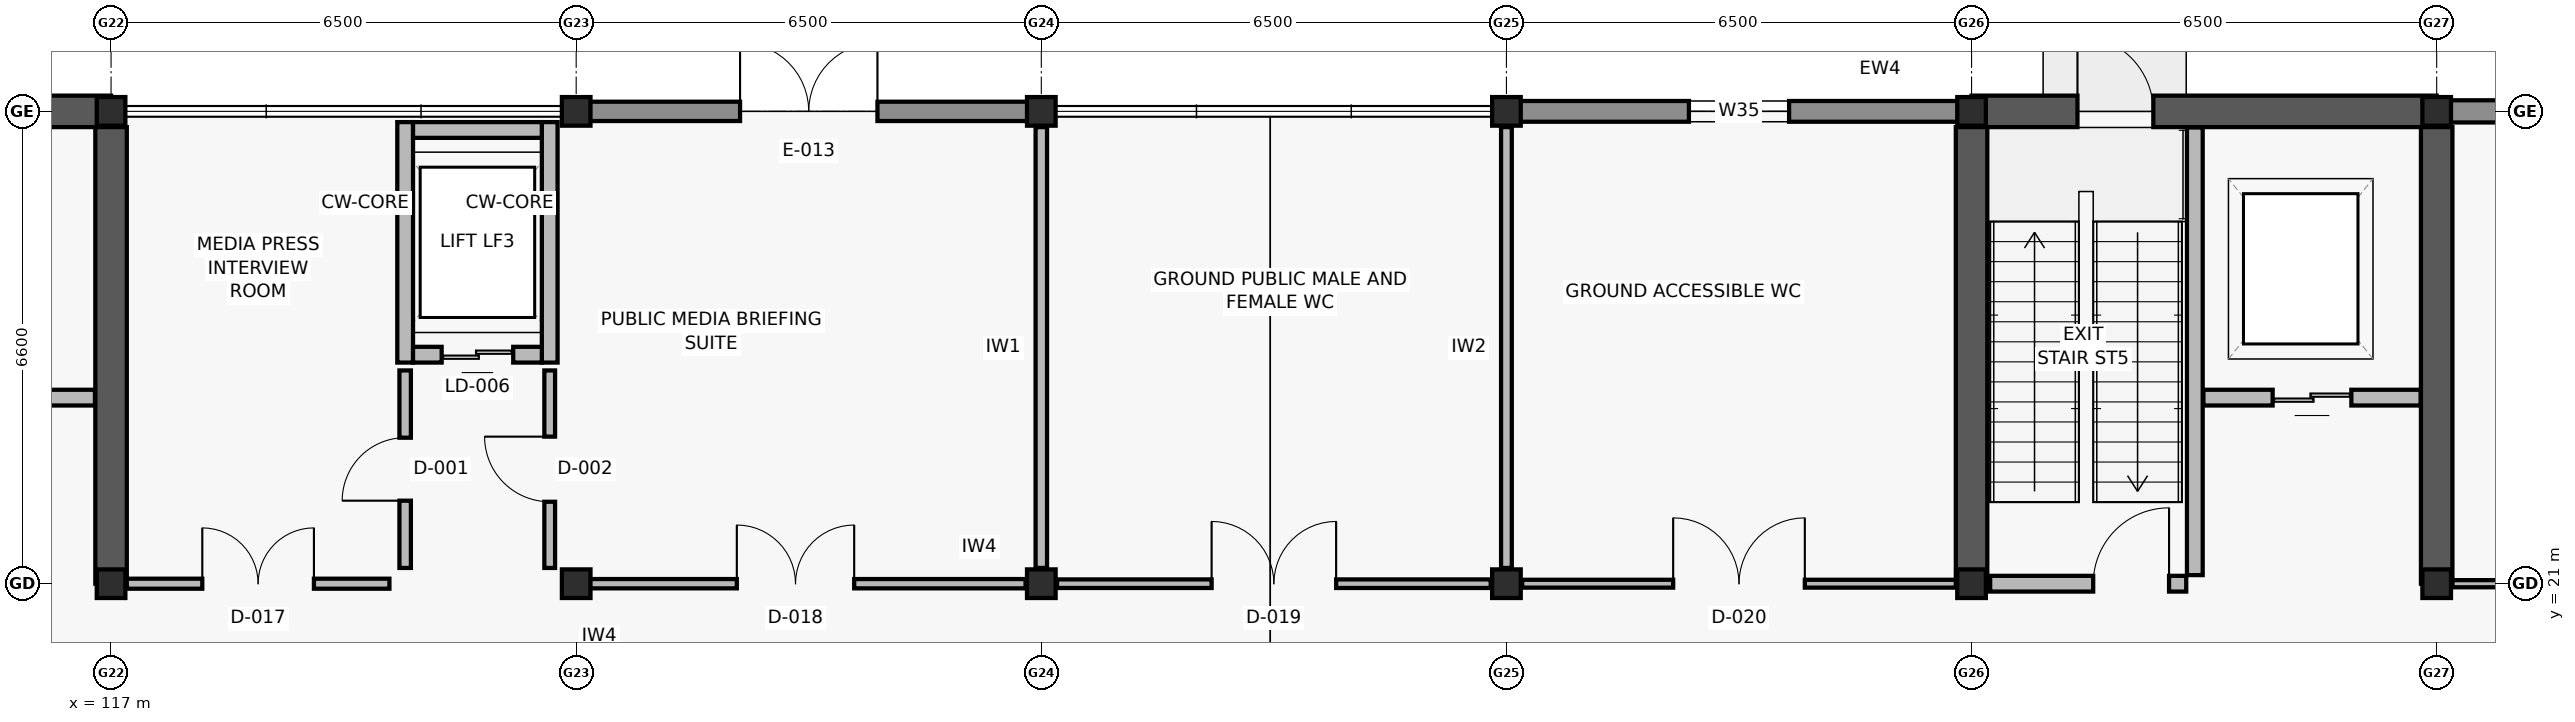
"""IFC4 building model, lengths in metres.
Left out: names, types, materials, properties, quantities, classifications, styles, units other than length and angle.
Written with IfcOpenShell. Run it as: python <this file> out.ifc"""

import sys

from ifc_helpers import new_model, si_unit, direction, frame, frame_2d, origin, origin_2d, place, context, subcontext, project, spatial, rectangle, i_section, extrude, element, fill, save


model = new_model("IFC4")
c1 = context("Model", 3, precision=1e-05, world=origin(), true_north=direction((0.0, 1.0)))
c2 = subcontext(c1, "Body", "Model", "MODEL_VIEW")
j1 = project(units=[si_unit("LENGTHUNIT", "METRE"), si_unit("PLANEANGLEUNIT", "RADIAN")], contexts=[c1])
p1 = place(None, origin())
s1 = spatial("IfcSite", under=j1, at=p1, CompositionType="ELEMENT")
p2 = place(p1, origin())
s2 = spatial("IfcBuilding", under=s1, at=p2, CompositionType="ELEMENT")
p3 = place(p2, origin())
s3 = spatial("IfcBuildingStorey", under=s2, at=p3, CompositionType="ELEMENT", Elevation=0.0)
for number, where, z_axis, x_axis in (
    (1, (117.0, 21.0, 0.0), (0.0, 0.0, 1.0), (1.0, 0.0, 0.0)),
    (2, (117.0, 27.6, 0.0), (0.0, 0.0, 1.0), (1.0, 0.0, 0.0)),
    (3, (123.5, 21.0, 0.0), (0.0, 0.0, 1.0), (1.0, 0.0, 0.0)),
    (4, (123.5, 27.6, 0.0), (0.0, 0.0, 1.0), (1.0, 0.0, 0.0)),
    (5, (130.0, 21.0, 0.0), (0.0, 0.0, 1.0), (1.0, 0.0, 0.0)),
    (6, (130.0, 27.6, 0.0), (0.0, 0.0, 1.0), (1.0, 0.0, 0.0)),
    (7, (136.5, 21.0, 0.0), (0.0, 0.0, 1.0), (1.0, 0.0, 0.0)),
    (8, (136.5, 27.6, 0.0), (0.0, 0.0, 1.0), (1.0, 0.0, 0.0)),
    (9, (143.0, 21.0, 0.0), (0.0, 0.0, 1.0), (1.0, 0.0, 0.0)),
    (10, (143.0, 27.6, 0.0), (0.0, 0.0, 1.0), (1.0, 0.0, 0.0)),
    (11, (149.5, 21.0, 0.0), (0.0, 0.0, 1.0), (1.0, 0.0, 0.0)),
    (12, (149.5, 27.6, 0.0), (0.0, 0.0, 1.0), (1.0, 0.0, 0.0)),
):
    element("IfcColumn", number, at=place(p3, frame(where, z_axis=z_axis, x_axis=x_axis)), inside=s3, PredefinedType="COLUMN", context=c2, shape_type="SweptSolid", body=[
        extrude(i_section(OverallWidth=0.4, OverallDepth=0.4, WebThickness=0.02, FlangeThickness=0.032, at=origin_2d()), origin(), (0.0, 0.0, 1.0), 5.4),
    ])
p4 = place(p3, frame((110.5, 27.6, 0.0), z_axis=(0.0, 0.0, 1.0), x_axis=(1.0, 0.0, 0.0)))
e13 = element("IfcWall", 13, at=p4, inside=s3, PredefinedType="SHEAR", context=c2, shape_type="SweptSolid", body=[
    extrude(rectangle(XDim=6.5, YDim=0.44, at=frame_2d((3.25, 0.0))), origin(), (0.0, 0.0, 1.0), 5.16),
])
p5 = place(p4, frame((1.48, 0.0, 0.0)))
e14 = element("IfcOpeningElement", 14, at=p5, cuts=e13, PredefinedType="OPENING", context=c2, shape_type="SweptSolid", body=[
    extrude(rectangle(XDim=1.06, YDim=2.12, at=frame_2d((0.53, 1.06))), frame((0.0, 0.23, 0.0), z_axis=(0.0, -1.0, 0.0), x_axis=(1.0, 0.0, 0.0)), (0.0, 0.0, 1.0), 0.46),
])
p6 = place(p3, frame((117.0, 21.0, 0.0), z_axis=(0.0, 0.0, 1.0), x_axis=(0.0, 1.0, 0.0)))
e15 = element("IfcWall", 15, at=p6, inside=s3, PredefinedType="SHEAR", context=c2, shape_type="SweptSolid", body=[
    extrude(rectangle(XDim=6.38, YDim=0.44, at=frame_2d((3.19, 0.0))), origin(), (0.0, 0.0, 1.0), 5.16),
])
p7 = place(p3, frame((143.0, 27.6, 0.0), z_axis=(0.0, 0.0, 1.0), x_axis=(1.0, 0.0, 0.0)))
e16 = element("IfcWall", 16, at=p7, inside=s3, PredefinedType="SHEAR", context=c2, shape_type="SweptSolid", body=[
    extrude(rectangle(XDim=6.5, YDim=0.44, at=frame_2d((3.25, 0.0))), origin(), (0.0, 0.0, 1.0), 5.16),
])
p8 = place(p7, frame((1.48, 0.0, 0.0)))
e17 = element("IfcOpeningElement", 17, at=p8, cuts=e16, PredefinedType="OPENING", context=c2, shape_type="SweptSolid", body=[
    extrude(rectangle(XDim=1.06, YDim=2.12, at=frame_2d((0.53, 1.06))), frame((0.0, 0.23, 0.0), z_axis=(0.0, -1.0, 0.0), x_axis=(1.0, 0.0, 0.0)), (0.0, 0.0, 1.0), 0.46),
])
for number, where, z_axis, x_axis in (
    (18, (143.0, 21.0, 0.0), (0.0, 0.0, 1.0), (0.0, 1.0, 0.0)),
    (19, (149.5, 21.0, 0.0), (0.0, 0.0, 1.0), (0.0, 1.0, 0.0)),
):
    element("IfcWall", number, at=place(p3, frame(where, z_axis=z_axis, x_axis=x_axis)), inside=s3, PredefinedType="SHEAR", context=c2, shape_type="SweptSolid", body=[
        extrude(rectangle(XDim=6.38, YDim=0.44, at=frame_2d((3.19, 0.0))), origin(), (0.0, 0.0, 1.0), 5.16),
    ])
p9 = place(p3, frame((123.505, 27.6, 0.0), z_axis=(0.0, 0.0, 1.0), x_axis=(1.0, 0.0, 0.0)))
e20 = element("IfcWall", 20, at=p9, inside=s3, PredefinedType="SOLIDWALL", context=c2, shape_type="SweptSolid", body=[
    extrude(rectangle(XDim=6.49, YDim=0.27, at=frame_2d((3.245, 0.0))), origin(), (0.0, 0.0, 1.0), 4.52),
])
p10 = place(p9, frame((2.285, 0.0, 0.0)))
e21 = element("IfcOpeningElement", 21, at=p10, cuts=e20, PredefinedType="OPENING", context=c2, shape_type="SweptSolid", body=[
    extrude(rectangle(XDim=1.92, YDim=2.25, at=frame_2d((0.96, 1.125))), frame((0.0, 0.145, 0.0), z_axis=(0.0, -1.0, 0.0), x_axis=(1.0, 0.0, 0.0)), (0.0, 0.0, 1.0), 0.29),
])
p11 = place(p3, frame((136.505, 27.6, 0.0), z_axis=(0.0, 0.0, 1.0), x_axis=(1.0, 0.0, 0.0)))
e22 = element("IfcWall", 22, at=p11, inside=s3, PredefinedType="SOLIDWALL", context=c2, shape_type="SweptSolid", body=[
    extrude(rectangle(XDim=6.49, YDim=0.29, at=frame_2d((3.245, 0.0))), origin(), (0.0, 0.0, 1.0), 4.52),
])
p12 = place(p11, frame((2.545, 0.0, 0.8)))
e23 = element("IfcOpeningElement", 23, at=p12, cuts=e22, PredefinedType="OPENING", context=c2, shape_type="SweptSolid", body=[
    extrude(rectangle(XDim=1.4, YDim=1.5, at=frame_2d((0.7, 0.75))), frame((0.0, 0.155, 0.0), z_axis=(0.0, -1.0, 0.0), x_axis=(1.0, 0.0, 0.0)), (0.0, 0.0, 1.0), 0.31),
])
p13 = place(p3, frame((149.505, 27.6, 0.0), z_axis=(0.0, 0.0, 1.0), x_axis=(1.0, 0.0, 0.0)))
e24 = element("IfcWall", 24, at=p13, inside=s3, PredefinedType="SOLIDWALL", context=c2, shape_type="SweptSolid", body=[
    extrude(rectangle(XDim=6.49, YDim=0.31, at=frame_2d((3.245, 0.0))), origin(), (0.0, 0.0, 1.0), 4.52),
])
p14 = place(p13, frame((2.47, 0.0, 0.8)))
e25 = element("IfcOpeningElement", 25, at=p14, cuts=e24, PredefinedType="OPENING", context=c2, shape_type="SweptSolid", body=[
    extrude(rectangle(XDim=1.55, YDim=1.5, at=frame_2d((0.775, 0.75))), frame((0.0, 0.165, 0.0), z_axis=(0.0, -1.0, 0.0), x_axis=(1.0, 0.0, 0.0)), (0.0, 0.0, 1.0), 0.33),
])
p15 = place(p3, frame((113.74, 23.6, 0.0), z_axis=(0.0, 0.0, 1.0), x_axis=(1.0, 0.0, 0.0)))
e26 = element("IfcWall", 26, at=p15, inside=s3, PredefinedType="SOLIDWALL", context=c2, shape_type="SweptSolid", body=[
    extrude(rectangle(XDim=3.035, YDim=0.22, at=frame_2d((1.518, 0.0))), origin(), (0.0, 0.0, 1.0), 5.16),
])
p16 = place(p15, frame((0.968, 0.0, 0.0)))
e27 = element("IfcOpeningElement", 27, at=p16, cuts=e26, PredefinedType="OPENING", context=c2, shape_type="SweptSolid", body=[
    extrude(rectangle(XDim=1.1, YDim=2.1, at=frame_2d((0.55, 1.05))), frame((0.0, 0.12, 0.0), z_axis=(0.0, -1.0, 0.0), x_axis=(1.0, 0.0, 0.0)), (0.0, 0.0, 1.0), 0.24),
])
for number, where, z_axis, x_axis in (
    (28, (121.11, 24.09, 0.0), (0.0, 0.0, 1.0), (0.0, 1.0, 0.0)),
    (29, (123.13, 24.09, 0.0), (0.0, 0.0, 1.0), (0.0, 1.0, 0.0)),
):
    element("IfcWall", number, at=place(p3, frame(where, z_axis=z_axis, x_axis=x_axis)), inside=s3, PredefinedType="SOLIDWALL", context=c2, shape_type="SweptSolid", body=[
        extrude(rectangle(XDim=3.36, YDim=0.22, at=frame_2d((1.68, 0.0))), origin(), (0.0, 0.0, 1.0), 5.16),
    ])
p17 = place(p3, frame((121.22, 27.34, 0.0), z_axis=(0.0, 0.0, 1.0), x_axis=(1.0, 0.0, 0.0)))
e30 = element("IfcWall", 30, at=p17, inside=s3, PredefinedType="SOLIDWALL", context=c2, shape_type="SweptSolid", body=[
    extrude(rectangle(XDim=1.8, YDim=0.22, at=frame_2d((0.9, 0.0))), origin(), (0.0, 0.0, 1.0), 5.16),
])
p18 = place(p3, frame((121.22, 24.2, 0.0), z_axis=(0.0, 0.0, 1.0), x_axis=(1.0, 0.0, 0.0)))
e31 = element("IfcWall", 31, at=p18, inside=s3, PredefinedType="SOLIDWALL", context=c2, shape_type="SweptSolid", body=[
    extrude(rectangle(XDim=1.8, YDim=0.22, at=frame_2d((0.9, 0.0))), origin(), (0.0, 0.0, 1.0), 5.16),
])
p19 = place(p18, frame((0.4, 0.0, 0.0)))
e32 = element("IfcOpeningElement", 32, at=p19, cuts=e31, PredefinedType="OPENING", context=c2, shape_type="SweptSolid", body=[
    extrude(rectangle(XDim=1.0, YDim=2.1, at=frame_2d((0.5, 1.05))), frame((0.0, 0.12, 0.0), z_axis=(0.0, -1.0, 0.0), x_axis=(1.0, 0.0, 0.0)), (0.0, 0.0, 1.0), 0.24),
])
p20 = place(p3, frame((146.12, 21.12, 0.0), z_axis=(0.0, 0.0, 1.0), x_axis=(0.0, 1.0, 0.0)))
e33 = element("IfcWall", 33, at=p20, inside=s3, PredefinedType="SOLIDWALL", context=c2, shape_type="SweptSolid", body=[
    extrude(rectangle(XDim=6.255, YDim=0.22, at=frame_2d((3.127, 0.0))), origin(), (0.0, 0.0, 1.0), 5.16),
])
p21 = place(p3, frame((143.26, 21.0, 0.0), z_axis=(0.0, 0.0, 1.0), x_axis=(1.0, 0.0, 0.0)))
e34 = element("IfcWall", 34, at=p21, inside=s3, PredefinedType="SOLIDWALL", context=c2, shape_type="SweptSolid", body=[
    extrude(rectangle(XDim=2.74, YDim=0.22, at=frame_2d((1.37, 0.0))), origin(), (0.0, 0.0, 1.0), 4.52),
])
p22 = place(p21, frame((1.44, 0.0, 0.0)))
e35 = element("IfcOpeningElement", 35, at=p22, cuts=e34, PredefinedType="OPENING", context=c2, shape_type="SweptSolid", body=[
    extrude(rectangle(XDim=1.06, YDim=2.1, at=frame_2d((0.53, 1.05))), frame((0.0, 0.12, 0.0), z_axis=(0.0, -1.0, 0.0), x_axis=(1.0, 0.0, 0.0)), (0.0, 0.0, 1.0), 0.24),
])
p23 = place(p3, frame((146.24, 23.6, 0.0), z_axis=(0.0, 0.0, 1.0), x_axis=(1.0, 0.0, 0.0)))
e36 = element("IfcWall", 36, at=p23, inside=s3, PredefinedType="SOLIDWALL", context=c2, shape_type="SweptSolid", body=[
    extrude(rectangle(XDim=3.035, YDim=0.22, at=frame_2d((1.518, 0.0))), origin(), (0.0, 0.0, 1.0), 5.16),
])
p24 = place(p23, frame((0.968, 0.0, 0.0)))
e37 = element("IfcOpeningElement", 37, at=p24, cuts=e36, PredefinedType="OPENING", context=c2, shape_type="SweptSolid", body=[
    extrude(rectangle(XDim=1.1, YDim=2.1, at=frame_2d((0.55, 1.05))), frame((0.0, 0.12, 0.0), z_axis=(0.0, -1.0, 0.0), x_axis=(1.0, 0.0, 0.0)), (0.0, 0.0, 1.0), 0.24),
])
p25 = place(p3, frame((121.11, 21.22, 0.0), z_axis=(0.0, 0.0, 1.0), x_axis=(0.0, 1.0, 0.0)))
e38 = element("IfcWall", 38, at=p25, inside=s3, PredefinedType="PARTITIONING", context=c2, shape_type="SweptSolid", body=[
    extrude(rectangle(XDim=2.76, YDim=0.16, at=frame_2d((1.38, 0.0))), origin(), (0.0, 0.0, 1.0), 4.5),
])
p26 = place(p25, frame((0.94, 0.0, 0.0)))
e39 = element("IfcOpeningElement", 39, at=p26, cuts=e38, PredefinedType="OPENING", context=c2, shape_type="SweptSolid", body=[
    extrude(rectangle(XDim=0.88, YDim=2.04, at=frame_2d((0.44, 1.02))), frame((0.0, 0.09, 0.0), z_axis=(0.0, -1.0, 0.0), x_axis=(1.0, 0.0, 0.0)), (0.0, 0.0, 1.0), 0.18),
])
p27 = place(p3, frame((123.13, 21.22, 0.0), z_axis=(0.0, 0.0, 1.0), x_axis=(0.0, 1.0, 0.0)))
e40 = element("IfcWall", 40, at=p27, inside=s3, PredefinedType="PARTITIONING", context=c2, shape_type="SweptSolid", body=[
    extrude(rectangle(XDim=2.76, YDim=0.15, at=frame_2d((1.38, 0.0))), origin(), (0.0, 0.0, 1.0), 4.5),
])
p28 = place(p27, frame((0.925, 0.0, 0.0)))
e41 = element("IfcOpeningElement", 41, at=p28, cuts=e40, PredefinedType="OPENING", context=c2, shape_type="SweptSolid", body=[
    extrude(rectangle(XDim=0.91, YDim=2.06, at=frame_2d((0.455, 1.03))), frame((0.0, 0.085, 0.0), z_axis=(0.0, -1.0, 0.0), x_axis=(1.0, 0.0, 0.0)), (0.0, 0.0, 1.0), 0.17),
])
p29 = place(p3, frame((117.22, 21.0, 0.0), z_axis=(0.0, 0.0, 1.0), x_axis=(1.0, 0.0, 0.0)))
e42 = element("IfcWall", 42, at=p29, inside=s3, PredefinedType="PARTITIONING", context=c2, shape_type="SweptSolid", body=[
    extrude(rectangle(XDim=3.67, YDim=0.14, at=frame_2d((1.835, 0.0))), origin(), (0.0, 0.0, 1.0), 4.5),
])
p30 = place(p29, frame((1.055, 0.0, 0.0)))
e43 = element("IfcOpeningElement", 43, at=p30, cuts=e42, PredefinedType="OPENING", context=c2, shape_type="SweptSolid", body=[
    extrude(rectangle(XDim=1.56, YDim=2.18, at=frame_2d((0.78, 1.09))), frame((0.0, 0.08, 0.0), z_axis=(0.0, -1.0, 0.0), x_axis=(1.0, 0.0, 0.0)), (0.0, 0.0, 1.0), 0.16),
])
p31 = place(p3, frame((123.35, 21.0, 0.0), z_axis=(0.0, 0.0, 1.0), x_axis=(1.0, 0.0, 0.0)))
e44 = element("IfcWall", 44, at=p31, inside=s3, PredefinedType="PARTITIONING", context=c2, shape_type="SweptSolid", body=[
    extrude(rectangle(XDim=6.43, YDim=0.13, at=frame_2d((3.215, 0.0))), origin(), (0.0, 0.0, 1.0), 4.5),
])
p32 = place(p31, frame((2.395, 0.0, 0.0)))
e45 = element("IfcOpeningElement", 45, at=p32, cuts=e44, PredefinedType="OPENING", context=c2, shape_type="SweptSolid", body=[
    extrude(rectangle(XDim=1.64, YDim=2.2, at=frame_2d((0.82, 1.1))), frame((0.0, 0.075, 0.0), z_axis=(0.0, -1.0, 0.0), x_axis=(1.0, 0.0, 0.0)), (0.0, 0.0, 1.0), 0.15),
])
p33 = place(p3, frame((130.22, 21.0, 0.0), z_axis=(0.0, 0.0, 1.0), x_axis=(1.0, 0.0, 0.0)))
e46 = element("IfcWall", 46, at=p33, inside=s3, PredefinedType="PARTITIONING", context=c2, shape_type="SweptSolid", body=[
    extrude(rectangle(XDim=6.06, YDim=0.12, at=frame_2d((3.03, 0.0))), origin(), (0.0, 0.0, 1.0), 4.5),
])
p34 = place(p33, frame((2.16, 0.0, 0.0)))
e47 = element("IfcOpeningElement", 47, at=p34, cuts=e46, PredefinedType="OPENING", context=c2, shape_type="SweptSolid", body=[
    extrude(rectangle(XDim=1.74, YDim=2.2, at=frame_2d((0.87, 1.1))), frame((0.0, 0.07, 0.0), z_axis=(0.0, -1.0, 0.0), x_axis=(1.0, 0.0, 0.0)), (0.0, 0.0, 1.0), 0.14),
])
p35 = place(p3, frame((136.72, 21.0, 0.0), z_axis=(0.0, 0.0, 1.0), x_axis=(1.0, 0.0, 0.0)))
e48 = element("IfcWall", 48, at=p35, inside=s3, PredefinedType="PARTITIONING", context=c2, shape_type="SweptSolid", body=[
    extrude(rectangle(XDim=6.06, YDim=0.11, at=frame_2d((3.03, 0.0))), origin(), (0.0, 0.0, 1.0), 4.5),
])
p36 = place(p35, frame((2.11, 0.0, 0.0)))
e49 = element("IfcOpeningElement", 49, at=p36, cuts=e48, PredefinedType="OPENING", context=c2, shape_type="SweptSolid", body=[
    extrude(rectangle(XDim=1.84, YDim=2.22, at=frame_2d((0.92, 1.11))), frame((0.0, 0.065, 0.0), z_axis=(0.0, -1.0, 0.0), x_axis=(1.0, 0.0, 0.0)), (0.0, 0.0, 1.0), 0.13),
])
p37 = place(p3, frame((149.72, 21.0, 0.0), z_axis=(0.0, 0.0, 1.0), x_axis=(1.0, 0.0, 0.0)))
e50 = element("IfcWall", 50, at=p37, inside=s3, PredefinedType="PARTITIONING", context=c2, shape_type="SweptSolid", body=[
    extrude(rectangle(XDim=12.46, YDim=0.1, at=frame_2d((6.23, 0.0))), origin(), (0.0, 0.0, 1.0), 4.5),
])
p38 = place(p37, frame((6.54, 0.0, 0.0)))
e51 = element("IfcOpeningElement", 51, at=p38, cuts=e50, PredefinedType="OPENING", context=c2, shape_type="SweptSolid", body=[
    extrude(rectangle(XDim=0.88, YDim=2.04, at=frame_2d((0.44, 1.02))), frame((0.0, 0.06, 0.0), z_axis=(0.0, -1.0, 0.0), x_axis=(1.0, 0.0, 0.0)), (0.0, 0.0, 1.0), 0.12),
])
p39 = place(p3, frame((130.0, 21.22, 0.0), z_axis=(0.0, 0.0, 1.0), x_axis=(0.0, 1.0, 0.0)))
e52 = element("IfcWall", 52, at=p39, inside=s3, PredefinedType="PARTITIONING", context=c2, shape_type="SweptSolid", body=[
    extrude(rectangle(XDim=6.16, YDim=0.16, at=frame_2d((3.08, 0.0))), origin(), (0.0, 0.0, 1.0), 4.5),
])
p40 = place(p3, frame((136.5, 21.22, 0.0), z_axis=(0.0, 0.0, 1.0), x_axis=(0.0, 1.0, 0.0)))
e53 = element("IfcWall", 53, at=p40, inside=s3, PredefinedType="PARTITIONING", context=c2, shape_type="SweptSolid", body=[
    extrude(rectangle(XDim=6.16, YDim=0.15, at=frame_2d((3.08, 0.0))), origin(), (0.0, 0.0, 1.0), 4.5),
])
p41 = place(p10, origin())
e54 = element("IfcDoor", 54, at=p41, inside=s3, OperationType="DOUBLE_DOOR_SINGLE_SWING", PredefinedType="DOOR", context=c2, shape_type="SweptSolid", body=[
    extrude(rectangle(XDim=1.92, YDim=2.25, at=frame_2d((0.96, 1.125))), frame((0.0, 0.025, 0.0), z_axis=(0.0, -1.0, 0.0), x_axis=(1.0, 0.0, 0.0)), (0.0, 0.0, 1.0), 0.05),
])
fill(e21, e54)
p42 = place(p12, origin())
e55 = element("IfcWindow", 55, at=p42, inside=s3, PartitioningType="SINGLE_PANEL", PredefinedType="WINDOW", context=c2, shape_type="SweptSolid", body=[
    extrude(rectangle(XDim=1.4, YDim=1.5, at=frame_2d((0.7, 0.75))), frame((0.0, 0.03, 0.0), z_axis=(0.0, -1.0, 0.0), x_axis=(1.0, 0.0, 0.0)), (0.0, 0.0, 1.0), 0.06),
])
fill(e23, e55)
p43 = place(p19, origin())
e56 = element("IfcDoor", 56, at=p43, inside=s3, OperationType="DOUBLE_DOOR_SLIDING", PredefinedType="DOOR", context=c2, shape_type="SweptSolid", body=[
    extrude(rectangle(XDim=1.0, YDim=2.1, at=frame_2d((0.5, 1.05))), frame((0.0, 0.025, 0.0), z_axis=(0.0, -1.0, 0.0), x_axis=(1.0, 0.0, 0.0)), (0.0, 0.0, 1.0), 0.05),
])
fill(e32, e56)
p44 = place(p22, origin())
e57 = element("IfcDoor", 57, at=p44, inside=s3, OperationType="SINGLE_SWING_RIGHT", PredefinedType="DOOR", context=c2, shape_type="SweptSolid", body=[
    extrude(rectangle(XDim=1.06, YDim=2.1, at=frame_2d((0.53, 1.05))), frame((0.0, 0.025, 0.0), z_axis=(0.0, -1.0, 0.0), x_axis=(1.0, 0.0, 0.0)), (0.0, 0.0, 1.0), 0.05),
])
fill(e35, e57)
p45 = place(p8, origin())
e58 = element("IfcDoor", 58, at=p45, inside=s3, OperationType="SINGLE_SWING_LEFT", PredefinedType="DOOR", context=c2, shape_type="SweptSolid", body=[
    extrude(rectangle(XDim=1.06, YDim=2.12, at=frame_2d((0.53, 1.06))), frame((0.0, 0.025, 0.0), z_axis=(0.0, -1.0, 0.0), x_axis=(1.0, 0.0, 0.0)), (0.0, 0.0, 1.0), 0.05),
])
fill(e17, e58)
p46 = place(p24, origin())
e59 = element("IfcDoor", 59, at=p46, inside=s3, OperationType="DOUBLE_DOOR_SLIDING", PredefinedType="DOOR", context=c2, shape_type="SweptSolid", body=[
    extrude(rectangle(XDim=1.1, YDim=2.1, at=frame_2d((0.55, 1.05))), frame((0.0, 0.025, 0.0), z_axis=(0.0, -1.0, 0.0), x_axis=(1.0, 0.0, 0.0)), (0.0, 0.0, 1.0), 0.05),
])
fill(e37, e59)
p47 = place(p26, origin())
e60 = element("IfcDoor", 60, at=p47, inside=s3, OperationType="SINGLE_SWING_LEFT", PredefinedType="DOOR", context=c2, shape_type="SweptSolid", body=[
    extrude(rectangle(XDim=0.88, YDim=2.04, at=frame_2d((0.44, 1.02))), frame((0.0, 0.025, 0.0), z_axis=(0.0, -1.0, 0.0), x_axis=(1.0, 0.0, 0.0)), (0.0, 0.0, 1.0), 0.05),
])
fill(e39, e60)
p48 = place(p28, origin())
e61 = element("IfcDoor", 61, at=p48, inside=s3, OperationType="SINGLE_SWING_RIGHT", PredefinedType="DOOR", context=c2, shape_type="SweptSolid", body=[
    extrude(rectangle(XDim=0.91, YDim=2.06, at=frame_2d((0.455, 1.03))), frame((0.0, 0.025, 0.0), z_axis=(0.0, -1.0, 0.0), x_axis=(1.0, 0.0, 0.0)), (0.0, 0.0, 1.0), 0.05),
])
fill(e41, e61)
p49 = place(p30, origin())
e62 = element("IfcDoor", 62, at=p49, inside=s3, OperationType="DOUBLE_DOOR_SINGLE_SWING", PredefinedType="DOOR", context=c2, shape_type="SweptSolid", body=[
    extrude(rectangle(XDim=1.56, YDim=2.18, at=frame_2d((0.78, 1.09))), frame((0.0, 0.025, 0.0), z_axis=(0.0, -1.0, 0.0), x_axis=(1.0, 0.0, 0.0)), (0.0, 0.0, 1.0), 0.05),
])
fill(e43, e62)
p50 = place(p32, origin())
e63 = element("IfcDoor", 63, at=p50, inside=s3, OperationType="DOUBLE_DOOR_SINGLE_SWING", PredefinedType="DOOR", context=c2, shape_type="SweptSolid", body=[
    extrude(rectangle(XDim=1.64, YDim=2.2, at=frame_2d((0.82, 1.1))), frame((0.0, 0.025, 0.0), z_axis=(0.0, -1.0, 0.0), x_axis=(1.0, 0.0, 0.0)), (0.0, 0.0, 1.0), 0.05),
])
fill(e45, e63)
p51 = place(p34, origin())
e64 = element("IfcDoor", 64, at=p51, inside=s3, OperationType="DOUBLE_DOOR_SINGLE_SWING", PredefinedType="DOOR", context=c2, shape_type="SweptSolid", body=[
    extrude(rectangle(XDim=1.74, YDim=2.2, at=frame_2d((0.87, 1.1))), frame((0.0, 0.025, 0.0), z_axis=(0.0, -1.0, 0.0), x_axis=(1.0, 0.0, 0.0)), (0.0, 0.0, 1.0), 0.05),
])
fill(e47, e64)
p52 = place(p36, origin())
e65 = element("IfcDoor", 65, at=p52, inside=s3, OperationType="DOUBLE_DOOR_SINGLE_SWING", PredefinedType="DOOR", context=c2, shape_type="SweptSolid", body=[
    extrude(rectangle(XDim=1.84, YDim=2.22, at=frame_2d((0.92, 1.11))), frame((0.0, 0.025, 0.0), z_axis=(0.0, -1.0, 0.0), x_axis=(1.0, 0.0, 0.0)), (0.0, 0.0, 1.0), 0.05),
])
fill(e49, e65)
save(model, sys.argv[1])
